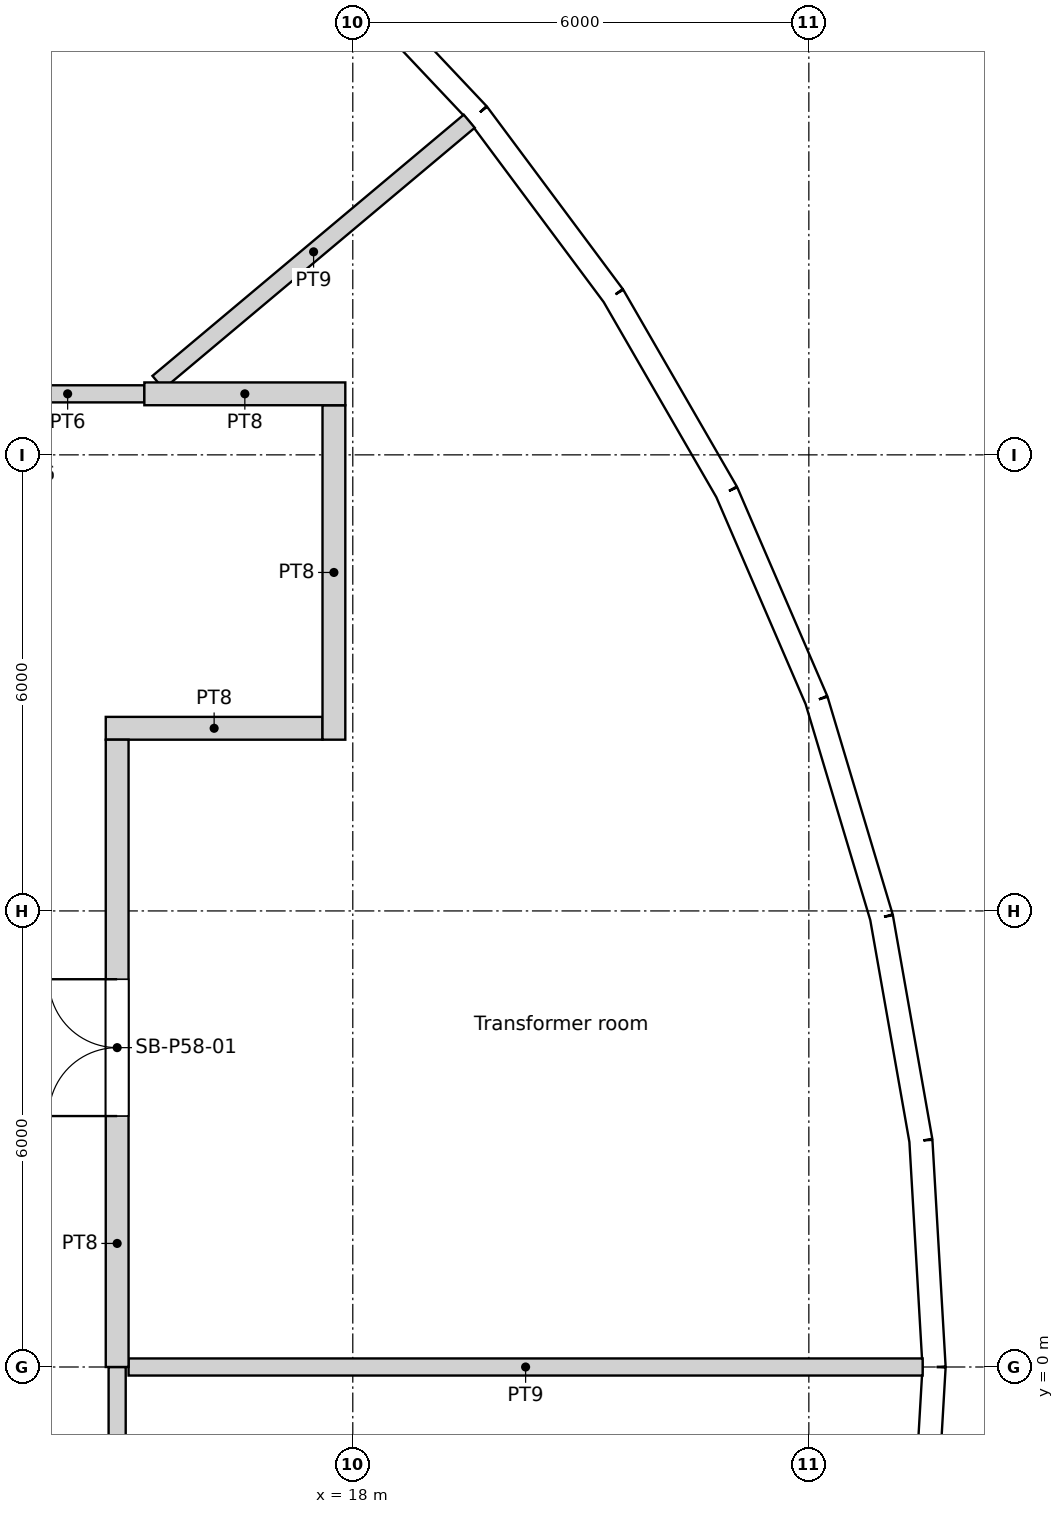
"""IFC4 building model, lengths in metres.
Left out: names, types, materials, properties, quantities, classifications, styles, units other than length and angle.
Written with IfcOpenShell. Run it as: python <this file> out.ifc"""

import sys

from ifc_helpers import new_model, si_unit, direction, frame, frame_2d, origin, origin_2d, place, context, subcontext, project, spatial, rectangle, circle, extrude, element, fill, save


model = new_model("IFC4")
c1 = context("Model", 3, precision=1e-05, world=origin(), true_north=direction((0.0, 1.0)))
c2 = subcontext(c1, "Body", "Model", "MODEL_VIEW")
j1 = project(units=[si_unit("LENGTHUNIT", "METRE"), si_unit("PLANEANGLEUNIT", "RADIAN")], contexts=[c1])
p1 = place(None, origin())
s1 = spatial("IfcSite", under=j1, at=p1, CompositionType="ELEMENT")
p2 = place(p1, origin())
s2 = spatial("IfcBuilding", under=s1, at=p2, CompositionType="ELEMENT")
p3 = place(p2, frame((0.0, 0.0, 225.0)))
s3 = spatial("IfcBuildingStorey", under=s2, at=p3, CompositionType="ELEMENT", Elevation=225.0)
for number, where, z_axis, x_axis in (
    (1, (24.548, 0.0, 0.0), (0.0, 0.0, 1.0), (1.0, 0.0, 0.0)),
    (2, (23.886, 5.661, 0.0), (0.0, 0.0, 1.0), (1.0, 0.0, 0.0)),
    (3, (21.937, 11.017, 0.0), (0.0, 0.0, 1.0), (1.0, 0.0, 0.0)),
    (4, (18.805, 15.779, 0.0), (0.0, 0.0, 1.0), (1.0, 0.0, 0.0)),
):
    element("IfcColumn", number, at=place(p3, frame(where, z_axis=z_axis, x_axis=x_axis)), inside=s3, PredefinedType="COLUMN", context=c2, shape_type="SweptSolid", body=[
        extrude(circle(Radius=0.6, at=origin_2d()), origin(), (0.0, 0.0, 1.0), 6.0),
    ])
for number, where, z_axis, x_axis in (
    (5, (18.822, 0.0, 0.0), (0.0, 0.0, 1.0), (1.0, 0.0, 0.0)),
    (6, (17.986, 5.548, 0.0), (0.0, 0.0, 1.0), (1.0, 0.0, 0.0)),
    (7, (15.552, 10.603, 0.0), (0.0, 0.0, 1.0), (1.0, 0.0, 0.0)),
):
    element("IfcColumn", number, at=place(p3, frame(where, z_axis=z_axis, x_axis=x_axis)), inside=s3, PredefinedType="COLUMN", context=c2, shape_type="SweptSolid", body=[
        extrude(circle(Radius=0.65, at=origin_2d()), origin(), (0.0, 0.0, 1.0), 6.0),
    ])
p4 = place(p3, frame((25.647, 0.0, 0.0), z_axis=(0.0, 0.0, 1.0), x_axis=(-0.058117409476, 0.998309754894, 0.0)))
e8 = element("IfcWall", 8, at=p4, inside=s3, PredefinedType="SOLIDWALL", context=c2, shape_type="SweptSolid", body=[
    extrude(rectangle(XDim=2.983, YDim=0.3, at=frame_2d((1.491, 0.0))), origin(), (0.0, 0.0, 1.0), 5.65),
])
p5 = place(p4, frame((1.491, 0.0, 1.825)))
e9 = element("IfcOpeningElement", 9, at=p5, cuts=e8, PredefinedType="OPENING", context=c2, shape_type="SweptSolid", body=[
    extrude(circle(Radius=1.2, at=origin_2d()), frame((0.0, 0.16, 0.0), z_axis=(0.0, -1.0, 0.0), x_axis=(1.0, 0.0, 0.0)), (0.0, 0.0, 1.0), 0.32),
])
p6 = place(p3, frame((25.474, 2.978, 0.0), z_axis=(0.0, 0.0, 1.0), x_axis=(-0.17369661102, 0.984799211677, 0.0)))
e10 = element("IfcWall", 10, at=p6, inside=s3, PredefinedType="SOLIDWALL", context=c2, shape_type="SweptSolid", body=[
    extrude(rectangle(XDim=2.983, YDim=0.3, at=frame_2d((1.491, 0.0))), origin(), (0.0, 0.0, 1.0), 5.65),
])
p7 = place(p6, frame((1.491, 0.0, 1.825)))
e11 = element("IfcOpeningElement", 11, at=p7, cuts=e10, PredefinedType="OPENING", context=c2, shape_type="SweptSolid", body=[
    extrude(circle(Radius=1.2, at=origin_2d()), frame((0.0, 0.16, 0.0), z_axis=(0.0, -1.0, 0.0), x_axis=(1.0, 0.0, 0.0)), (0.0, 0.0, 1.0), 0.32),
])
p8 = place(p3, frame((24.956, 5.915, 0.0), z_axis=(0.0, 0.0, 1.0), x_axis=(-0.286754535355, 0.958004089998, 0.0)))
e12 = element("IfcWall", 12, at=p8, inside=s3, PredefinedType="SOLIDWALL", context=c2, shape_type="SweptSolid", body=[
    extrude(rectangle(XDim=2.982, YDim=0.3, at=frame_2d((1.491, 0.0))), origin(), (0.0, 0.0, 1.0), 5.65),
])
p9 = place(p8, frame((1.491, 0.0, 1.825)))
e13 = element("IfcOpeningElement", 13, at=p9, cuts=e12, PredefinedType="OPENING", context=c2, shape_type="SweptSolid", body=[
    extrude(circle(Radius=1.2, at=origin_2d()), frame((0.0, 0.16, 0.0), z_axis=(0.0, -1.0, 0.0), x_axis=(1.0, 0.0, 0.0)), (0.0, 0.0, 1.0), 0.32),
])
p10 = place(p3, frame((24.101, 8.772, 0.0), z_axis=(0.0, 0.0, 1.0), x_axis=(-0.396111410027, 0.918202456349, 0.0)))
e14 = element("IfcWall", 14, at=p10, inside=s3, PredefinedType="SOLIDWALL", context=c2, shape_type="SweptSolid", body=[
    extrude(rectangle(XDim=2.982, YDim=0.3, at=frame_2d((1.491, 0.0))), origin(), (0.0, 0.0, 1.0), 5.65),
])
p11 = place(p10, frame((1.491, 0.0, 1.825)))
e15 = element("IfcOpeningElement", 15, at=p11, cuts=e14, PredefinedType="OPENING", context=c2, shape_type="SweptSolid", body=[
    extrude(circle(Radius=1.2, at=origin_2d()), frame((0.0, 0.16, 0.0), z_axis=(0.0, -1.0, 0.0), x_axis=(1.0, 0.0, 0.0)), (0.0, 0.0, 1.0), 0.32),
])
p12 = place(p3, frame((22.919, 11.51, 0.0), z_axis=(0.0, 0.0, 1.0), x_axis=(-0.499977539641, 0.866038370891, 0.0)))
e16 = element("IfcWall", 16, at=p12, inside=s3, PredefinedType="SOLIDWALL", context=c2, shape_type="SweptSolid", body=[
    extrude(rectangle(XDim=2.983, YDim=0.3, at=frame_2d((1.491, 0.0))), origin(), (0.0, 0.0, 1.0), 5.65),
])
p13 = place(p12, frame((1.491, 0.0, 1.825)))
e17 = element("IfcOpeningElement", 17, at=p13, cuts=e16, PredefinedType="OPENING", context=c2, shape_type="SweptSolid", body=[
    extrude(circle(Radius=1.2, at=origin_2d()), frame((0.0, 0.16, 0.0), z_axis=(0.0, -1.0, 0.0), x_axis=(1.0, 0.0, 0.0)), (0.0, 0.0, 1.0), 0.32),
])
p14 = place(p3, frame((21.428, 14.094, 0.0), z_axis=(0.0, 0.0, 1.0), x_axis=(-0.597206768034, 0.802087324557, 0.0)))
e18 = element("IfcWall", 18, at=p14, inside=s3, PredefinedType="SOLIDWALL", context=c2, shape_type="SweptSolid", body=[
    extrude(rectangle(XDim=2.983, YDim=0.3, at=frame_2d((1.491, 0.0))), origin(), (0.0, 0.0, 1.0), 5.65),
])
p15 = place(p14, frame((1.491, 0.0, 1.825)))
e19 = element("IfcOpeningElement", 19, at=p15, cuts=e18, PredefinedType="OPENING", context=c2, shape_type="SweptSolid", body=[
    extrude(circle(Radius=1.2, at=origin_2d()), frame((0.0, 0.16, 0.0), z_axis=(0.0, -1.0, 0.0), x_axis=(1.0, 0.0, 0.0)), (0.0, 0.0, 1.0), 0.32),
])
p16 = place(p3, frame((19.647, 16.486, 0.0), z_axis=(0.0, 0.0, 1.0), x_axis=(-0.686219609698, 0.72739442345, 0.0)))
e20 = element("IfcWall", 20, at=p16, inside=s3, PredefinedType="SOLIDWALL", context=c2, shape_type="SweptSolid", body=[
    extrude(rectangle(XDim=2.982, YDim=0.3, at=frame_2d((1.491, 0.0))), origin(), (0.0, 0.0, 1.0), 5.65),
])
p17 = place(p16, frame((1.491, 0.0, 1.825)))
e21 = element("IfcOpeningElement", 21, at=p17, cuts=e20, PredefinedType="OPENING", context=c2, shape_type="SweptSolid", body=[
    extrude(circle(Radius=1.2, at=origin_2d()), frame((0.0, 0.16, 0.0), z_axis=(0.0, -1.0, 0.0), x_axis=(1.0, 0.0, 0.0)), (0.0, 0.0, 1.0), 0.32),
])
p18 = place(p3, frame((25.474, -2.978, 0.0), z_axis=(0.0, 0.0, 1.0), x_axis=(0.058117409476, 0.998309754894, 0.0)))
e22 = element("IfcWall", 22, at=p18, inside=s3, PredefinedType="SOLIDWALL", context=c2, shape_type="SweptSolid", body=[
    extrude(rectangle(XDim=2.983, YDim=0.3, at=frame_2d((1.491, 0.0))), origin(), (0.0, 0.0, 1.0), 5.65),
])
p19 = place(p18, frame((1.491, 0.0, 1.825)))
e23 = element("IfcOpeningElement", 23, at=p19, cuts=e22, PredefinedType="OPENING", context=c2, shape_type="SweptSolid", body=[
    extrude(circle(Radius=1.2, at=origin_2d()), frame((0.0, 0.16, 0.0), z_axis=(0.0, -1.0, 0.0), x_axis=(1.0, 0.0, 0.0)), (0.0, 0.0, 1.0), 0.32),
])
p20 = place(p3, frame((14.9, -8.29, 0.0), z_axis=(0.0, 0.0, 1.0), x_axis=(0.0, 1.0, 0.0)))
e24 = element("IfcWall", 24, at=p20, inside=s3, PredefinedType="PARTITIONING", context=c2, shape_type="SweptSolid", body=[
    extrude(rectangle(XDim=8.29, YDim=0.225, at=frame_2d((4.145, 0.0))), origin(), (0.0, 0.0, 1.0), 5.2),
])
p21 = place(p20, frame((3.589, 0.0, 0.0)))
e25 = element("IfcOpeningElement", 25, at=p21, cuts=e24, PredefinedType="OPENING", context=c2, shape_type="SweptSolid", body=[
    extrude(rectangle(XDim=1.0, YDim=2.1, at=frame_2d((0.5, 1.05))), frame((0.0, 0.113, 0.0), z_axis=(0.0, -1.0, 0.0), x_axis=(1.0, 0.0, 0.0)), (0.0, 0.0, 1.0), 0.225),
])
p22 = place(p3, frame((14.9, 0.0, 0.0), z_axis=(0.0, 0.0, 1.0), x_axis=(0.0, 1.0, 0.0)))
e26 = element("IfcWall", 26, at=p22, inside=s3, PredefinedType="PARTITIONING", context=c2, shape_type="SweptSolid", body=[
    extrude(rectangle(XDim=8.253, YDim=0.3, at=frame_2d((4.126, 0.0))), origin(), (0.0, 0.0, 1.0), 5.2),
])
p23 = place(p22, frame((3.302, 0.0, 0.0)))
e27 = element("IfcOpeningElement", 27, at=p23, cuts=e26, PredefinedType="OPENING", context=c2, shape_type="SweptSolid", body=[
    extrude(rectangle(XDim=1.8, YDim=2.4, at=frame_2d((0.9, 1.2))), frame((0.0, 0.15, 0.0), z_axis=(0.0, -1.0, 0.0), x_axis=(1.0, 0.0, 0.0)), (0.0, 0.0, 1.0), 0.3),
])
p24 = place(p3, frame((14.75, 8.403, 0.0), z_axis=(0.0, 0.0, 1.0), x_axis=(1.0, 0.0, 0.0)))
e28 = element("IfcWall", 28, at=p24, inside=s3, PredefinedType="PARTITIONING", context=c2, shape_type="SweptSolid", body=[
    extrude(rectangle(XDim=2.852, YDim=0.3, at=frame_2d((1.426, 0.0))), origin(), (0.0, 0.0, 1.0), 5.2),
])
p25 = place(p3, frame((15.258, 12.803, 0.0), z_axis=(0.0, 0.0, 1.0), x_axis=(-1.0, 0.0, 0.0)))
e29 = element("IfcWall", 29, at=p25, inside=s3, PredefinedType="PARTITIONING", context=c2, shape_type="SweptSolid", body=[
    extrude(rectangle(XDim=2.019, YDim=0.225, at=frame_2d((1.009, 0.0))), origin(), (0.0, 0.0, 1.0), 5.2),
])
p26 = place(p3, frame((17.752, 8.253, 0.0), z_axis=(0.0, 0.0, 1.0), x_axis=(0.0, 1.0, 0.0)))
e30 = element("IfcWall", 30, at=p26, inside=s3, PredefinedType="PARTITIONING", context=c2, shape_type="SweptSolid", body=[
    extrude(rectangle(XDim=4.4, YDim=0.3, at=frame_2d((2.2, 0.0))), origin(), (0.0, 0.0, 1.0), 5.2),
])
p27 = place(p3, frame((17.902, 12.803, 0.0), z_axis=(0.0, 0.0, 1.0), x_axis=(-1.0, 0.0, 0.0)))
e31 = element("IfcWall", 31, at=p27, inside=s3, PredefinedType="PARTITIONING", context=c2, shape_type="SweptSolid", body=[
    extrude(rectangle(XDim=2.644, YDim=0.3, at=frame_2d((1.322, 0.0))), origin(), (0.0, 0.0, 1.0), 5.2),
])
p28 = place(p3, frame((19.532, 16.389, 0.0), z_axis=(0.0, 0.0, 1.0), x_axis=(-0.766023242491, -0.642812874765, 0.0)))
e32 = element("IfcWall", 32, at=p28, inside=s3, PredefinedType="PARTITIONING", context=c2, shape_type="SweptSolid", body=[
    extrude(rectangle(XDim=5.346, YDim=0.225, at=frame_2d((2.673, 0.0))), origin(), (0.0, 0.0, 1.0), 2.7),
])
p29 = place(p3, frame((25.497, 0.0, 0.0), z_axis=(0.0, 0.0, 1.0), x_axis=(-1.0, 0.0, 0.0)))
e33 = element("IfcWall", 33, at=p29, inside=s3, PredefinedType="PARTITIONING", context=c2, shape_type="SweptSolid", body=[
    extrude(rectangle(XDim=10.447, YDim=0.225, at=frame_2d((5.224, 0.0))), origin(), (0.0, 0.0, 1.0), 2.7),
])
p30 = place(p5, origin())
e34 = element("IfcWindow", 34, at=p30, inside=s3, PartitioningType="SINGLE_PANEL", PredefinedType="WINDOW", context=c2, shape_type="SweptSolid", body=[
    extrude(circle(Radius=1.2, at=origin_2d()), frame((0.0, 0.12, 0.0), z_axis=(0.0, -1.0, 0.0), x_axis=(1.0, 0.0, 0.0)), (0.0, 0.0, 1.0), 0.1),
])
fill(e9, e34)
p31 = place(p7, origin())
e35 = element("IfcWindow", 35, at=p31, inside=s3, PartitioningType="SINGLE_PANEL", PredefinedType="WINDOW", context=c2, shape_type="SweptSolid", body=[
    extrude(circle(Radius=1.2, at=origin_2d()), frame((0.0, 0.12, 0.0), z_axis=(0.0, -1.0, 0.0), x_axis=(1.0, 0.0, 0.0)), (0.0, 0.0, 1.0), 0.1),
])
fill(e11, e35)
p32 = place(p9, origin())
e36 = element("IfcWindow", 36, at=p32, inside=s3, PartitioningType="SINGLE_PANEL", PredefinedType="WINDOW", context=c2, shape_type="SweptSolid", body=[
    extrude(circle(Radius=1.2, at=origin_2d()), frame((0.0, 0.12, 0.0), z_axis=(0.0, -1.0, 0.0), x_axis=(1.0, 0.0, 0.0)), (0.0, 0.0, 1.0), 0.1),
])
fill(e13, e36)
p33 = place(p11, origin())
e37 = element("IfcWindow", 37, at=p33, inside=s3, PartitioningType="SINGLE_PANEL", PredefinedType="WINDOW", context=c2, shape_type="SweptSolid", body=[
    extrude(circle(Radius=1.2, at=origin_2d()), frame((0.0, 0.12, 0.0), z_axis=(0.0, -1.0, 0.0), x_axis=(1.0, 0.0, 0.0)), (0.0, 0.0, 1.0), 0.1),
])
fill(e15, e37)
p34 = place(p13, origin())
e38 = element("IfcWindow", 38, at=p34, inside=s3, PartitioningType="SINGLE_PANEL", PredefinedType="WINDOW", context=c2, shape_type="SweptSolid", body=[
    extrude(circle(Radius=1.2, at=origin_2d()), frame((0.0, 0.12, 0.0), z_axis=(0.0, -1.0, 0.0), x_axis=(1.0, 0.0, 0.0)), (0.0, 0.0, 1.0), 0.1),
])
fill(e17, e38)
p35 = place(p15, origin())
e39 = element("IfcWindow", 39, at=p35, inside=s3, PartitioningType="SINGLE_PANEL", PredefinedType="WINDOW", context=c2, shape_type="SweptSolid", body=[
    extrude(circle(Radius=1.2, at=origin_2d()), frame((0.0, 0.12, 0.0), z_axis=(0.0, -1.0, 0.0), x_axis=(1.0, 0.0, 0.0)), (0.0, 0.0, 1.0), 0.1),
])
fill(e19, e39)
p36 = place(p17, origin())
e40 = element("IfcWindow", 40, at=p36, inside=s3, PartitioningType="SINGLE_PANEL", PredefinedType="WINDOW", context=c2, shape_type="SweptSolid", body=[
    extrude(circle(Radius=1.2, at=origin_2d()), frame((0.0, 0.12, 0.0), z_axis=(0.0, -1.0, 0.0), x_axis=(1.0, 0.0, 0.0)), (0.0, 0.0, 1.0), 0.1),
])
fill(e21, e40)
p37 = place(p19, origin())
e41 = element("IfcWindow", 41, at=p37, inside=s3, PartitioningType="SINGLE_PANEL", PredefinedType="WINDOW", context=c2, shape_type="SweptSolid", body=[
    extrude(circle(Radius=1.2, at=origin_2d()), frame((0.0, 0.12, 0.0), z_axis=(0.0, -1.0, 0.0), x_axis=(1.0, 0.0, 0.0)), (0.0, 0.0, 1.0), 0.1),
])
fill(e23, e41)
p38 = place(p23, origin())
e42 = element("IfcDoor", 42, at=p38, inside=s3, OperationType="DOUBLE_DOOR_SINGLE_SWING", PredefinedType="DOOR", context=c2, shape_type="SweptSolid", body=[
    extrude(rectangle(XDim=1.8, YDim=2.4, at=frame_2d((0.9, 1.2))), frame((0.0, 0.025, 0.0), z_axis=(0.0, -1.0, 0.0), x_axis=(1.0, 0.0, 0.0)), (0.0, 0.0, 1.0), 0.05),
])
fill(e27, e42)
save(model, sys.argv[1])
